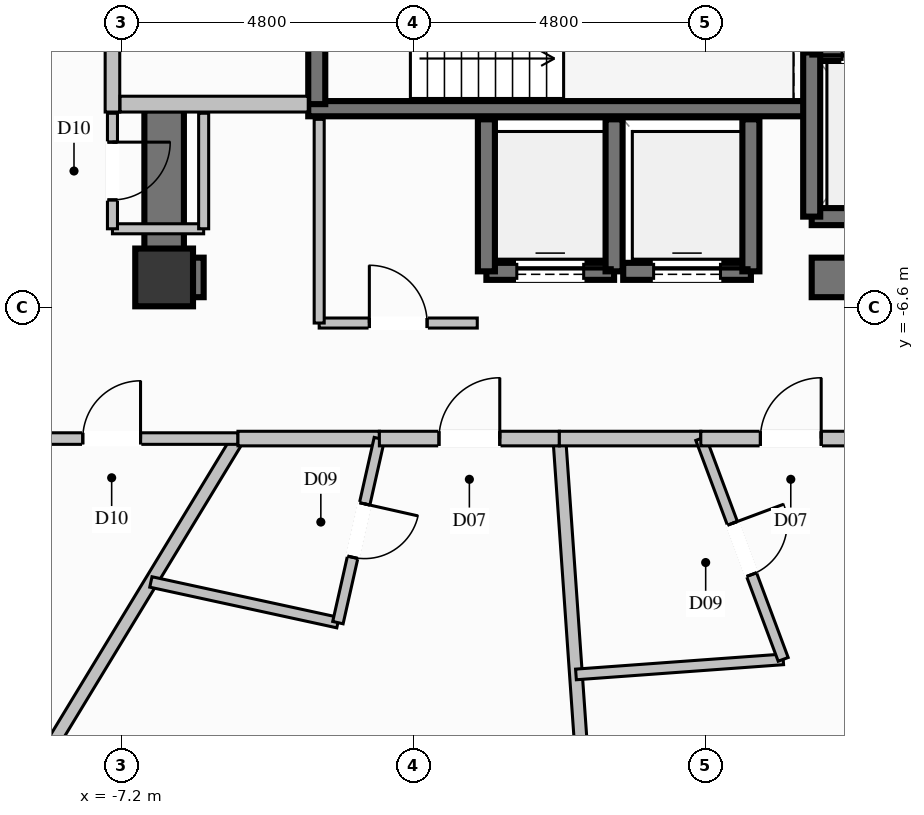
"""IFC4 building model, lengths in metres.
Left out: names, types, materials, properties, quantities, classifications, styles, units other than length and angle.
Written with IfcOpenShell. Run it as: python <this file> out.ifc"""

import sys

from ifc_helpers import new_model, si_unit, direction, frame, frame_2d, origin, origin_2d, place, context, subcontext, project, spatial, rectangle, extrude, element, fill, save


model = new_model("IFC4")
c1 = context("Model", 3, precision=1e-05, world=origin(), true_north=direction((0.0, 1.0)))
c2 = subcontext(c1, "Body", "Model", "MODEL_VIEW")
j1 = project(units=[si_unit("LENGTHUNIT", "METRE"), si_unit("PLANEANGLEUNIT", "RADIAN")], contexts=[c1])
p1 = place(None, origin())
s1 = spatial("IfcSite", under=j1, at=p1, CompositionType="ELEMENT")
p2 = place(p1, origin())
s2 = spatial("IfcBuilding", under=s1, at=p2, CompositionType="ELEMENT")
p3 = place(p2, frame((0.0, 0.0, 138.6)))
s3 = spatial("IfcBuildingStorey", under=s2, at=p3, CompositionType="ELEMENT", Elevation=138.6)
p4 = place(p3, frame((-6.5, -6.1, 0.0), z_axis=(0.0, 0.0, 1.0), x_axis=(1.0, 0.0, 0.0)))
e1 = element("IfcColumn", 1, at=p4, inside=s3, PredefinedType="COLUMN", context=c2, shape_type="SweptSolid", body=[
    extrude(rectangle(XDim=0.95, YDim=0.95, at=origin_2d()), origin(), (0.0, 0.0, 1.0), 3.6),
])
p5 = place(p3, frame((-4.13, -3.325, 0.0), z_axis=(0.0, 0.0, 1.0), x_axis=(1.0, 0.0, 0.0)))
e2 = element("IfcWall", 2, at=p5, inside=s3, PredefinedType="SOLIDWALL", context=c2, shape_type="SweptSolid", body=[
    extrude(rectangle(XDim=8.26, YDim=0.25, at=frame_2d((4.13, 0.0))), origin(), (0.0, 0.0, 1.0), 3.6),
])
p6 = place(p3, frame((-6.175, -6.1, 0.0), z_axis=(0.0, 0.0, 1.0), x_axis=(1.0, 0.0, 0.0)))
e3 = element("IfcWall", 3, at=p6, inside=s3, PredefinedType="SHEAR", context=c2, shape_type="SweptSolid", body=[
    extrude(rectangle(XDim=0.325, YDim=0.65, at=frame_2d((0.163, 0.0))), origin(), (0.0, 0.0, 1.0), 3.6),
])
p7 = place(p3, frame((4.15, -6.1, 0.0), z_axis=(0.0, 0.0, 1.0), x_axis=(1.0, 0.0, 0.0)))
e4 = element("IfcWall", 4, at=p7, inside=s3, PredefinedType="SHEAR", context=c2, shape_type="SweptSolid", body=[
    extrude(rectangle(XDim=2.025, YDim=0.65, at=frame_2d((1.013, 0.0))), origin(), (0.0, 0.0, 1.0), 3.6),
])
p8 = place(p3, frame((-6.5, -6.425, 0.0), z_axis=(0.0, 0.0, 1.0), x_axis=(0.0, 1.0, 0.0)))
e5 = element("IfcWall", 5, at=p8, inside=s3, PredefinedType="SHEAR", context=c2, shape_type="SweptSolid", body=[
    extrude(rectangle(XDim=3.075, YDim=0.65, at=frame_2d((1.538, 0.0))), origin(), (0.0, 0.0, 1.0), 3.6),
])
p9 = place(p3, frame((-1.2, -6.0, 0.0), z_axis=(0.0, 0.0, 1.0), x_axis=(1.0, 0.0, 0.0)))
e6 = element("IfcWall", 6, at=p9, inside=s3, PredefinedType="SOLIDWALL", context=c2, shape_type="SweptSolid", body=[
    extrude(rectangle(XDim=2.1, YDim=0.28, at=frame_2d((1.05, 0.0))), origin(), (0.0, 0.0, 1.0), 3.35),
])
p10 = place(p9, frame((0.5, 0.0, 0.0)))
e7 = element("IfcOpeningElement", 7, at=p10, cuts=e6, PredefinedType="OPENING", context=c2, shape_type="SweptSolid", body=[
    extrude(rectangle(XDim=1.1, YDim=2.2, at=frame_2d((0.55, 1.1))), frame((0.0, 0.15, 0.0), z_axis=(0.0, -1.0, 0.0), x_axis=(1.0, 0.0, 0.0)), (0.0, 0.0, 1.0), 0.3),
])
for number, where, z_axis, x_axis in (
    (8, (-1.2, -3.5, 0.0), (0.0, 0.0, 1.0), (0.0, -1.0, 0.0)),
    (9, (0.9, -6.0, 0.0), (0.0, 0.0, 1.0), (0.0, 1.0, 0.0)),
):
    element("IfcWall", number, at=place(p3, frame(where, z_axis=z_axis, x_axis=x_axis)), inside=s3, PredefinedType="SOLIDWALL", context=c2, shape_type="SweptSolid", body=[
        extrude(rectangle(XDim=2.5, YDim=0.28, at=frame_2d((1.25, 0.0))), origin(), (0.0, 0.0, 1.0), 3.35),
    ])
p11 = place(p3, frame((1.05, -6.0, 0.0), z_axis=(0.0, 0.0, 1.0), x_axis=(1.0, 0.0, 0.0)))
e10 = element("IfcWall", 10, at=p11, inside=s3, PredefinedType="SOLIDWALL", context=c2, shape_type="SweptSolid", body=[
    extrude(rectangle(XDim=2.1, YDim=0.28, at=frame_2d((1.05, 0.0))), origin(), (0.0, 0.0, 1.0), 3.35),
])
p12 = place(p11, frame((0.5, 0.0, 0.0)))
e11 = element("IfcOpeningElement", 11, at=p12, cuts=e10, PredefinedType="OPENING", context=c2, shape_type="SweptSolid", body=[
    extrude(rectangle(XDim=1.1, YDim=2.2, at=frame_2d((0.55, 1.1))), frame((0.0, 0.15, 0.0), z_axis=(0.0, -1.0, 0.0), x_axis=(1.0, 0.0, 0.0)), (0.0, 0.0, 1.0), 0.3),
])
p13 = place(p3, frame((3.15, -6.0, 0.0), z_axis=(0.0, 0.0, 1.0), x_axis=(0.0, 1.0, 0.0)))
e12 = element("IfcWall", 12, at=p13, inside=s3, PredefinedType="SOLIDWALL", context=c2, shape_type="SweptSolid", body=[
    extrude(rectangle(XDim=2.5, YDim=0.28, at=frame_2d((1.25, 0.0))), origin(), (0.0, 0.0, 1.0), 3.35),
])
p14 = place(p3, frame((4.15, -5.1, 0.0), z_axis=(0.0, 0.0, 1.0), x_axis=(1.0, 0.0, 0.0)))
e13 = element("IfcWall", 13, at=p14, inside=s3, PredefinedType="SOLIDWALL", context=c2, shape_type="SweptSolid", body=[
    extrude(rectangle(XDim=2.2, YDim=0.28, at=frame_2d((1.1, 0.0))), origin(), (0.0, 0.0, 1.0), 3.35),
])
p15 = place(p3, frame((6.35, -2.4, 0.0), z_axis=(0.0, 0.0, 1.0), x_axis=(-1.0, 0.0, 0.0)))
e14 = element("IfcWall", 14, at=p15, inside=s3, PredefinedType="SOLIDWALL", context=c2, shape_type="SweptSolid", body=[
    extrude(rectangle(XDim=2.2, YDim=0.28, at=frame_2d((1.1, 0.0))), origin(), (0.0, 0.0, 1.0), 3.35),
])
p16 = place(p15, frame((0.5, 0.0, 0.0)))
e15 = element("IfcOpeningElement", 15, at=p16, cuts=e14, PredefinedType="OPENING", context=c2, shape_type="SweptSolid", body=[
    extrude(rectangle(XDim=1.2, YDim=2.2, at=frame_2d((0.6, 1.1))), frame((0.0, 0.15, 0.0), z_axis=(0.0, -1.0, 0.0), x_axis=(1.0, 0.0, 0.0)), (0.0, 0.0, 1.0), 0.3),
])
p17 = place(p3, frame((4.15, -2.4, 0.0), z_axis=(0.0, 0.0, 1.0), x_axis=(0.0, -1.0, 0.0)))
e16 = element("IfcWall", 16, at=p17, inside=s3, PredefinedType="SOLIDWALL", context=c2, shape_type="SweptSolid", body=[
    extrude(rectangle(XDim=2.7, YDim=0.28, at=frame_2d((1.35, 0.0))), origin(), (0.0, 0.0, 1.0), 3.35),
])
p18 = place(p3, frame((-3.99, -3.25, 0.0), z_axis=(0.0, 0.0, 1.0), x_axis=(0.0, 1.0, 0.0)))
e17 = element("IfcWall", 17, at=p18, inside=s3, PredefinedType="SOLIDWALL", context=c2, shape_type="SweptSolid", body=[
    extrude(rectangle(XDim=5.46, YDim=0.28, at=frame_2d((2.73, 0.0))), origin(), (0.0, 0.0, 1.0), 3.35),
])
p19 = place(p18, frame((0.937, 0.0, 0.0)))
e18 = element("IfcOpeningElement", 18, at=p19, cuts=e17, PredefinedType="OPENING", context=c2, shape_type="SweptSolid", body=[
    extrude(rectangle(XDim=1.2, YDim=2.2, at=frame_2d((0.6, 1.1))), frame((0.0, 0.15, 0.0), z_axis=(0.0, -1.0, 0.0), x_axis=(1.0, 0.0, 0.0)), (0.0, 0.0, 1.0), 0.3),
])
p20 = place(p3, frame((-7.35, -3.38, 0.0), z_axis=(0.0, 0.0, 1.0), x_axis=(0.0, 1.0, 0.0)))
e19 = element("IfcWall", 19, at=p20, inside=s3, PredefinedType="PARTITIONING", context=c2, shape_type="SweptSolid", body=[
    extrude(rectangle(XDim=5.72, YDim=0.24, at=frame_2d((2.86, 0.0))), origin(), (0.0, 0.0, 1.0), 2.435),
])
p21 = place(p20, frame((1.599, 0.0, 0.0)))
e20 = element("IfcOpeningElement", 20, at=p21, cuts=e19, PredefinedType="OPENING", context=c2, shape_type="SweptSolid", body=[
    extrude(rectangle(XDim=1.15, YDim=2.2, at=frame_2d((0.575, 1.1))), frame((0.0, 0.13, 0.0), z_axis=(0.0, -1.0, 0.0), x_axis=(1.0, 0.0, 0.0)), (0.0, 0.0, 1.0), 0.26),
])
p22 = place(p3, frame((-7.225, -3.25, 0.0), z_axis=(0.0, 0.0, 1.0), x_axis=(1.0, 0.0, 0.0)))
e21 = element("IfcWall", 21, at=p22, inside=s3, PredefinedType="PARTITIONING", context=c2, shape_type="SweptSolid", body=[
    extrude(rectangle(XDim=3.095, YDim=0.26, at=frame_2d((1.548, 0.0))), origin(), (0.0, 0.0, 1.0), 3.35),
])
p23 = place(p3, frame((-7.35, -5.3, 0.0), z_axis=(0.0, 0.0, 1.0), x_axis=(1.0, 0.0, 0.0)))
e22 = element("IfcWall", 22, at=p23, inside=s3, PredefinedType="PARTITIONING", context=c2, shape_type="SweptSolid", body=[
    extrude(rectangle(XDim=1.5, YDim=0.165, at=frame_2d((0.75, 0.0))), origin(), (0.0, 0.0, 1.0), 2.435),
])
p24 = place(p3, frame((-5.85, -5.3, 0.0), z_axis=(0.0, 0.0, 1.0), x_axis=(0.0, 1.0, 0.0)))
e23 = element("IfcWall", 23, at=p24, inside=s3, PredefinedType="PARTITIONING", context=c2, shape_type="SweptSolid", body=[
    extrude(rectangle(XDim=1.9, YDim=0.165, at=frame_2d((0.95, 0.0))), origin(), (0.0, 0.0, 1.0), 2.435),
])
p25 = place(p3, frame((-7.35, -3.4, 0.0), z_axis=(0.0, 0.0, 1.0), x_axis=(0.0, -1.0, 0.0)))
e24 = element("IfcWall", 24, at=p25, inside=s3, PredefinedType="PARTITIONING", context=c2, shape_type="SweptSolid", body=[
    extrude(rectangle(XDim=1.9, YDim=0.165, at=frame_2d((0.95, 0.0))), origin(), (0.0, 0.0, 1.0), 3.35),
])
p26 = place(p25, frame((0.475, 0.0, 0.0)))
e25 = element("IfcOpeningElement", 25, at=p26, cuts=e24, PredefinedType="OPENING", context=c2, shape_type="SweptSolid", body=[
    extrude(rectangle(XDim=0.95, YDim=2.1, at=frame_2d((0.475, 1.05))), frame((0.0, 0.093, 0.0), z_axis=(0.0, -1.0, 0.0), x_axis=(1.0, 0.0, 0.0)), (0.0, 0.0, 1.0), 0.185),
])
p27 = place(p3, frame((-3.95, -6.85, 0.0), z_axis=(0.0, 0.0, 1.0), x_axis=(1.0, 0.0, 0.0)))
e26 = element("IfcWall", 26, at=p27, inside=s3, PredefinedType="PARTITIONING", context=c2, shape_type="SweptSolid", body=[
    extrude(rectangle(XDim=2.6, YDim=0.165, at=frame_2d((1.3, 0.0))), origin(), (0.0, 0.0, 1.0), 2.435),
])
p28 = place(p27, frame((0.825, 0.0, 0.0)))
e27 = element("IfcOpeningElement", 27, at=p28, cuts=e26, PredefinedType="OPENING", context=c2, shape_type="SweptSolid", body=[
    extrude(rectangle(XDim=0.95, YDim=2.1, at=frame_2d((0.475, 1.05))), frame((0.0, 0.093, 0.0), z_axis=(0.0, -1.0, 0.0), x_axis=(1.0, 0.0, 0.0)), (0.0, 0.0, 1.0), 0.185),
])
p29 = place(p3, frame((-3.95, -3.5, 0.0), z_axis=(0.0, 0.0, 1.0), x_axis=(0.0, -1.0, 0.0)))
e28 = element("IfcWall", 28, at=p29, inside=s3, PredefinedType="PARTITIONING", context=c2, shape_type="SweptSolid", body=[
    extrude(rectangle(XDim=3.35, YDim=0.165, at=frame_2d((1.675, 0.0))), origin(), (0.0, 0.0, 1.0), 3.35),
])
p30 = place(p3, frame((-5.286, -8.75, 0.0), z_axis=(0.0, 0.0, 1.0), x_axis=(-0.519068318579, -0.854732753934, 0.0)))
e29 = element("IfcWall", 29, at=p30, inside=s3, PredefinedType="PARTITIONING", context=c2, shape_type="SweptSolid", body=[
    extrude(rectangle(XDim=6.358, YDim=0.21, at=frame_2d((3.179, 0.0))), origin(), (0.0, 0.0, 1.0), 2.791),
])
p31 = place(p3, frame((-9.44, -8.75, 0.0), z_axis=(0.0, 0.0, 1.0), x_axis=(1.0, 0.0, 0.0)))
e30 = element("IfcWall", 30, at=p31, inside=s3, PredefinedType="PARTITIONING", context=c2, shape_type="SweptSolid", body=[
    extrude(rectangle(XDim=4.154, YDim=0.19, at=frame_2d((2.077, 0.0))), origin(), (0.0, 0.0, 1.0), 3.35),
])
p32 = place(p31, frame((1.602, 0.0, 0.0)))
e31 = element("IfcOpeningElement", 31, at=p32, cuts=e30, PredefinedType="OPENING", context=c2, shape_type="SweptSolid", body=[
    extrude(rectangle(XDim=0.95, YDim=2.1, at=frame_2d((0.475, 1.05))), frame((0.0, 0.105, 0.0), z_axis=(0.0, -1.0, 0.0), x_axis=(1.0, 0.0, 0.0)), (0.0, 0.0, 1.0), 0.21),
])
p33 = place(p3, frame((-5.286, -8.75, 0.0), z_axis=(0.0, 0.0, 1.0), x_axis=(1.0, 0.0, 0.0)))
e32 = element("IfcWall", 32, at=p33, inside=s3, PredefinedType="PARTITIONING", context=c2, shape_type="SweptSolid", body=[
    extrude(rectangle(XDim=2.326, YDim=0.24, at=frame_2d((1.163, 0.0))), origin(), (0.0, 0.0, 1.0), 3.35),
])
p34 = place(p3, frame((-6.718, -11.108, 0.0), z_axis=(0.0, 0.0, 1.0), x_axis=(0.977142752927, -0.212584196029, 0.0)))
e33 = element("IfcWall", 33, at=p34, inside=s3, PredefinedType="PLUMBINGWALL", context=c2, shape_type="SweptSolid", body=[
    extrude(rectangle(XDim=3.148, YDim=0.175, at=frame_2d((1.574, 0.0))), origin(), (0.0, 0.0, 1.0), 3.35),
])
p35 = place(p3, frame((-2.96, -8.75, 0.0), z_axis=(0.0, 0.0, 1.0), x_axis=(-0.219828583773, -0.975538514748, 0.0)))
e34 = element("IfcWall", 34, at=p35, inside=s3, PredefinedType="PLUMBINGWALL", context=c2, shape_type="SweptSolid", body=[
    extrude(rectangle(XDim=3.103, YDim=0.175, at=frame_2d((1.552, 0.0))), origin(), (0.0, 0.0, 1.0), 3.35),
])
p36 = place(p35, frame((1.101, 0.0, 0.0)))
e35 = element("IfcOpeningElement", 35, at=p36, cuts=e34, PredefinedType="OPENING", context=c2, shape_type="SweptSolid", body=[
    extrude(rectangle(XDim=0.9, YDim=2.1, at=frame_2d((0.45, 1.05))), frame((0.0, 0.098, 0.0), z_axis=(0.0, -1.0, 0.0), x_axis=(1.0, 0.0, 0.0)), (0.0, 0.0, 1.0), 0.195),
])
p37 = place(p3, frame((0.0, -8.75, 0.0), z_axis=(0.0, 0.0, 1.0), x_axis=(0.070112625277, -0.997539081829, 0.0)))
e36 = element("IfcWall", 36, at=p37, inside=s3, PredefinedType="PARTITIONING", context=c2, shape_type="SweptSolid", body=[
    extrude(rectangle(XDim=8.03, YDim=0.21, at=frame_2d((4.015, 0.0))), origin(), (0.0, 0.0, 1.0), 2.791),
])
p38 = place(p3, frame((-2.96, -8.75, 0.0), z_axis=(0.0, 0.0, 1.0), x_axis=(1.0, 0.0, 0.0)))
e37 = element("IfcWall", 37, at=p38, inside=s3, PredefinedType="PARTITIONING", context=c2, shape_type="SweptSolid", body=[
    extrude(rectangle(XDim=2.96, YDim=0.24, at=frame_2d((1.48, 0.0))), origin(), (0.0, 0.0, 1.0), 3.35),
])
p39 = place(p38, frame((0.98, 0.0, 0.0)))
e38 = element("IfcOpeningElement", 38, at=p39, cuts=e37, PredefinedType="OPENING", context=c2, shape_type="SweptSolid", body=[
    extrude(rectangle(XDim=1.0, YDim=2.2, at=frame_2d((0.5, 1.1))), frame((0.0, 0.13, 0.0), z_axis=(0.0, -1.0, 0.0), x_axis=(1.0, 0.0, 0.0)), (0.0, 0.0, 1.0), 0.26),
])
p40 = place(p3, frame((0.0, -8.75, 0.0), z_axis=(0.0, 0.0, 1.0), x_axis=(1.0, 0.0, 0.0)))
e39 = element("IfcWall", 39, at=p40, inside=s3, PredefinedType="PARTITIONING", context=c2, shape_type="SweptSolid", body=[
    extrude(rectangle(XDim=2.326, YDim=0.24, at=frame_2d((1.163, 0.0))), origin(), (0.0, 0.0, 1.0), 3.35),
])
p41 = place(p3, frame((0.273, -12.629, 0.0), z_axis=(0.0, 0.0, 1.0), x_axis=(0.997366850658, 0.07252148101, 0.0)))
e40 = element("IfcWall", 40, at=p41, inside=s3, PredefinedType="PLUMBINGWALL", context=c2, shape_type="SweptSolid", body=[
    extrude(rectangle(XDim=3.417, YDim=0.175, at=frame_2d((1.708, 0.0))), origin(), (0.0, 0.0, 1.0), 3.35),
])
p42 = place(p3, frame((2.326, -8.75, 0.0), z_axis=(0.0, 0.0, 1.0), x_axis=(0.349611151881, -0.936894894041, 0.0)))
e41 = element("IfcWall", 41, at=p42, inside=s3, PredefinedType="PLUMBINGWALL", context=c2, shape_type="SweptSolid", body=[
    extrude(rectangle(XDim=3.876, YDim=0.175, at=frame_2d((1.938, 0.0))), origin(), (0.0, 0.0, 1.0), 3.35),
])
p43 = place(p42, frame((1.488, 0.0, 0.0)))
e42 = element("IfcOpeningElement", 42, at=p43, cuts=e41, PredefinedType="OPENING", context=c2, shape_type="SweptSolid", body=[
    extrude(rectangle(XDim=0.9, YDim=2.1, at=frame_2d((0.45, 1.05))), frame((0.0, 0.098, 0.0), z_axis=(0.0, -1.0, 0.0), x_axis=(1.0, 0.0, 0.0)), (0.0, 0.0, 1.0), 0.195),
])
p44 = place(p3, frame((2.326, -8.75, 0.0), z_axis=(0.0, 0.0, 1.0), x_axis=(1.0, 0.0, 0.0)))
e43 = element("IfcWall", 43, at=p44, inside=s3, PredefinedType="PARTITIONING", context=c2, shape_type="SweptSolid", body=[
    extrude(rectangle(XDim=2.96, YDim=0.24, at=frame_2d((1.48, 0.0))), origin(), (0.0, 0.0, 1.0), 3.35),
])
p45 = place(p44, frame((0.98, 0.0, 0.0)))
e44 = element("IfcOpeningElement", 44, at=p45, cuts=e43, PredefinedType="OPENING", context=c2, shape_type="SweptSolid", body=[
    extrude(rectangle(XDim=1.0, YDim=2.2, at=frame_2d((0.5, 1.1))), frame((0.0, 0.13, 0.0), z_axis=(0.0, -1.0, 0.0), x_axis=(1.0, 0.0, 0.0)), (0.0, 0.0, 1.0), 0.26),
])
p46 = place(p10, origin())
e45 = element("IfcDoor", 45, at=p46, inside=s3, OperationType="SLIDING_TO_LEFT", PredefinedType="DOOR", context=c2, shape_type="SweptSolid", body=[
    extrude(rectangle(XDim=1.1, YDim=2.2, at=frame_2d((0.55, 1.1))), frame((0.0, 0.025, 0.0), z_axis=(0.0, -1.0, 0.0), x_axis=(1.0, 0.0, 0.0)), (0.0, 0.0, 1.0), 0.05),
])
fill(e7, e45)
p47 = place(p12, origin())
e46 = element("IfcDoor", 46, at=p47, inside=s3, OperationType="SLIDING_TO_LEFT", PredefinedType="DOOR", context=c2, shape_type="SweptSolid", body=[
    extrude(rectangle(XDim=1.1, YDim=2.2, at=frame_2d((0.55, 1.1))), frame((0.0, 0.025, 0.0), z_axis=(0.0, -1.0, 0.0), x_axis=(1.0, 0.0, 0.0)), (0.0, 0.0, 1.0), 0.05),
])
fill(e11, e46)
p48 = place(p16, origin())
e47 = element("IfcDoor", 47, at=p48, inside=s3, OperationType="SLIDING_TO_LEFT", PredefinedType="DOOR", context=c2, shape_type="SweptSolid", body=[
    extrude(rectangle(XDim=1.2, YDim=2.2, at=frame_2d((0.6, 1.1))), frame((0.0, 0.025, 0.0), z_axis=(0.0, -1.0, 0.0), x_axis=(1.0, 0.0, 0.0)), (0.0, 0.0, 1.0), 0.05),
])
fill(e15, e47)
p49 = place(p26, origin())
e48 = element("IfcDoor", 48, at=p49, inside=s3, OperationType="SINGLE_SWING_LEFT", PredefinedType="DOOR", context=c2, shape_type="SweptSolid", body=[
    extrude(rectangle(XDim=0.95, YDim=2.1, at=frame_2d((0.475, 1.05))), frame((0.0, 0.025, 0.0), z_axis=(0.0, -1.0, 0.0), x_axis=(1.0, 0.0, 0.0)), (0.0, 0.0, 1.0), 0.05),
])
fill(e25, e48)
p50 = place(p28, origin())
e49 = element("IfcDoor", 49, at=p50, inside=s3, OperationType="SINGLE_SWING_LEFT", PredefinedType="DOOR", context=c2, shape_type="SweptSolid", body=[
    extrude(rectangle(XDim=0.95, YDim=2.1, at=frame_2d((0.475, 1.05))), frame((0.0, 0.025, 0.0), z_axis=(0.0, -1.0, 0.0), x_axis=(1.0, 0.0, 0.0)), (0.0, 0.0, 1.0), 0.05),
])
fill(e27, e49)
p51 = place(p32, origin())
e50 = element("IfcDoor", 50, at=p51, inside=s3, OperationType="SINGLE_SWING_RIGHT", PredefinedType="DOOR", context=c2, shape_type="SweptSolid", body=[
    extrude(rectangle(XDim=0.95, YDim=2.1, at=frame_2d((0.475, 1.05))), frame((0.0, 0.025, 0.0), z_axis=(0.0, -1.0, 0.0), x_axis=(1.0, 0.0, 0.0)), (0.0, 0.0, 1.0), 0.05),
])
fill(e31, e50)
p52 = place(p36, origin())
e51 = element("IfcDoor", 51, at=p52, inside=s3, OperationType="SINGLE_SWING_LEFT", PredefinedType="DOOR", context=c2, shape_type="SweptSolid", body=[
    extrude(rectangle(XDim=0.9, YDim=2.1, at=frame_2d((0.45, 1.05))), frame((0.0, 0.025, 0.0), z_axis=(0.0, -1.0, 0.0), x_axis=(1.0, 0.0, 0.0)), (0.0, 0.0, 1.0), 0.05),
])
fill(e35, e51)
p53 = place(p39, origin())
e52 = element("IfcDoor", 52, at=p53, inside=s3, OperationType="SINGLE_SWING_RIGHT", PredefinedType="DOOR", context=c2, shape_type="SweptSolid", body=[
    extrude(rectangle(XDim=1.0, YDim=2.2, at=frame_2d((0.5, 1.1))), frame((0.0, 0.025, 0.0), z_axis=(0.0, -1.0, 0.0), x_axis=(1.0, 0.0, 0.0)), (0.0, 0.0, 1.0), 0.05),
])
fill(e38, e52)
p54 = place(p43, origin())
e53 = element("IfcDoor", 53, at=p54, inside=s3, OperationType="SINGLE_SWING_LEFT", PredefinedType="DOOR", context=c2, shape_type="SweptSolid", body=[
    extrude(rectangle(XDim=0.9, YDim=2.1, at=frame_2d((0.45, 1.05))), frame((0.0, 0.025, 0.0), z_axis=(0.0, -1.0, 0.0), x_axis=(1.0, 0.0, 0.0)), (0.0, 0.0, 1.0), 0.05),
])
fill(e42, e53)
p55 = place(p45, origin())
e54 = element("IfcDoor", 54, at=p55, inside=s3, OperationType="SINGLE_SWING_RIGHT", PredefinedType="DOOR", context=c2, shape_type="SweptSolid", body=[
    extrude(rectangle(XDim=1.0, YDim=2.2, at=frame_2d((0.5, 1.1))), frame((0.0, 0.025, 0.0), z_axis=(0.0, -1.0, 0.0), x_axis=(1.0, 0.0, 0.0)), (0.0, 0.0, 1.0), 0.05),
])
fill(e44, e54)
save(model, sys.argv[1])
